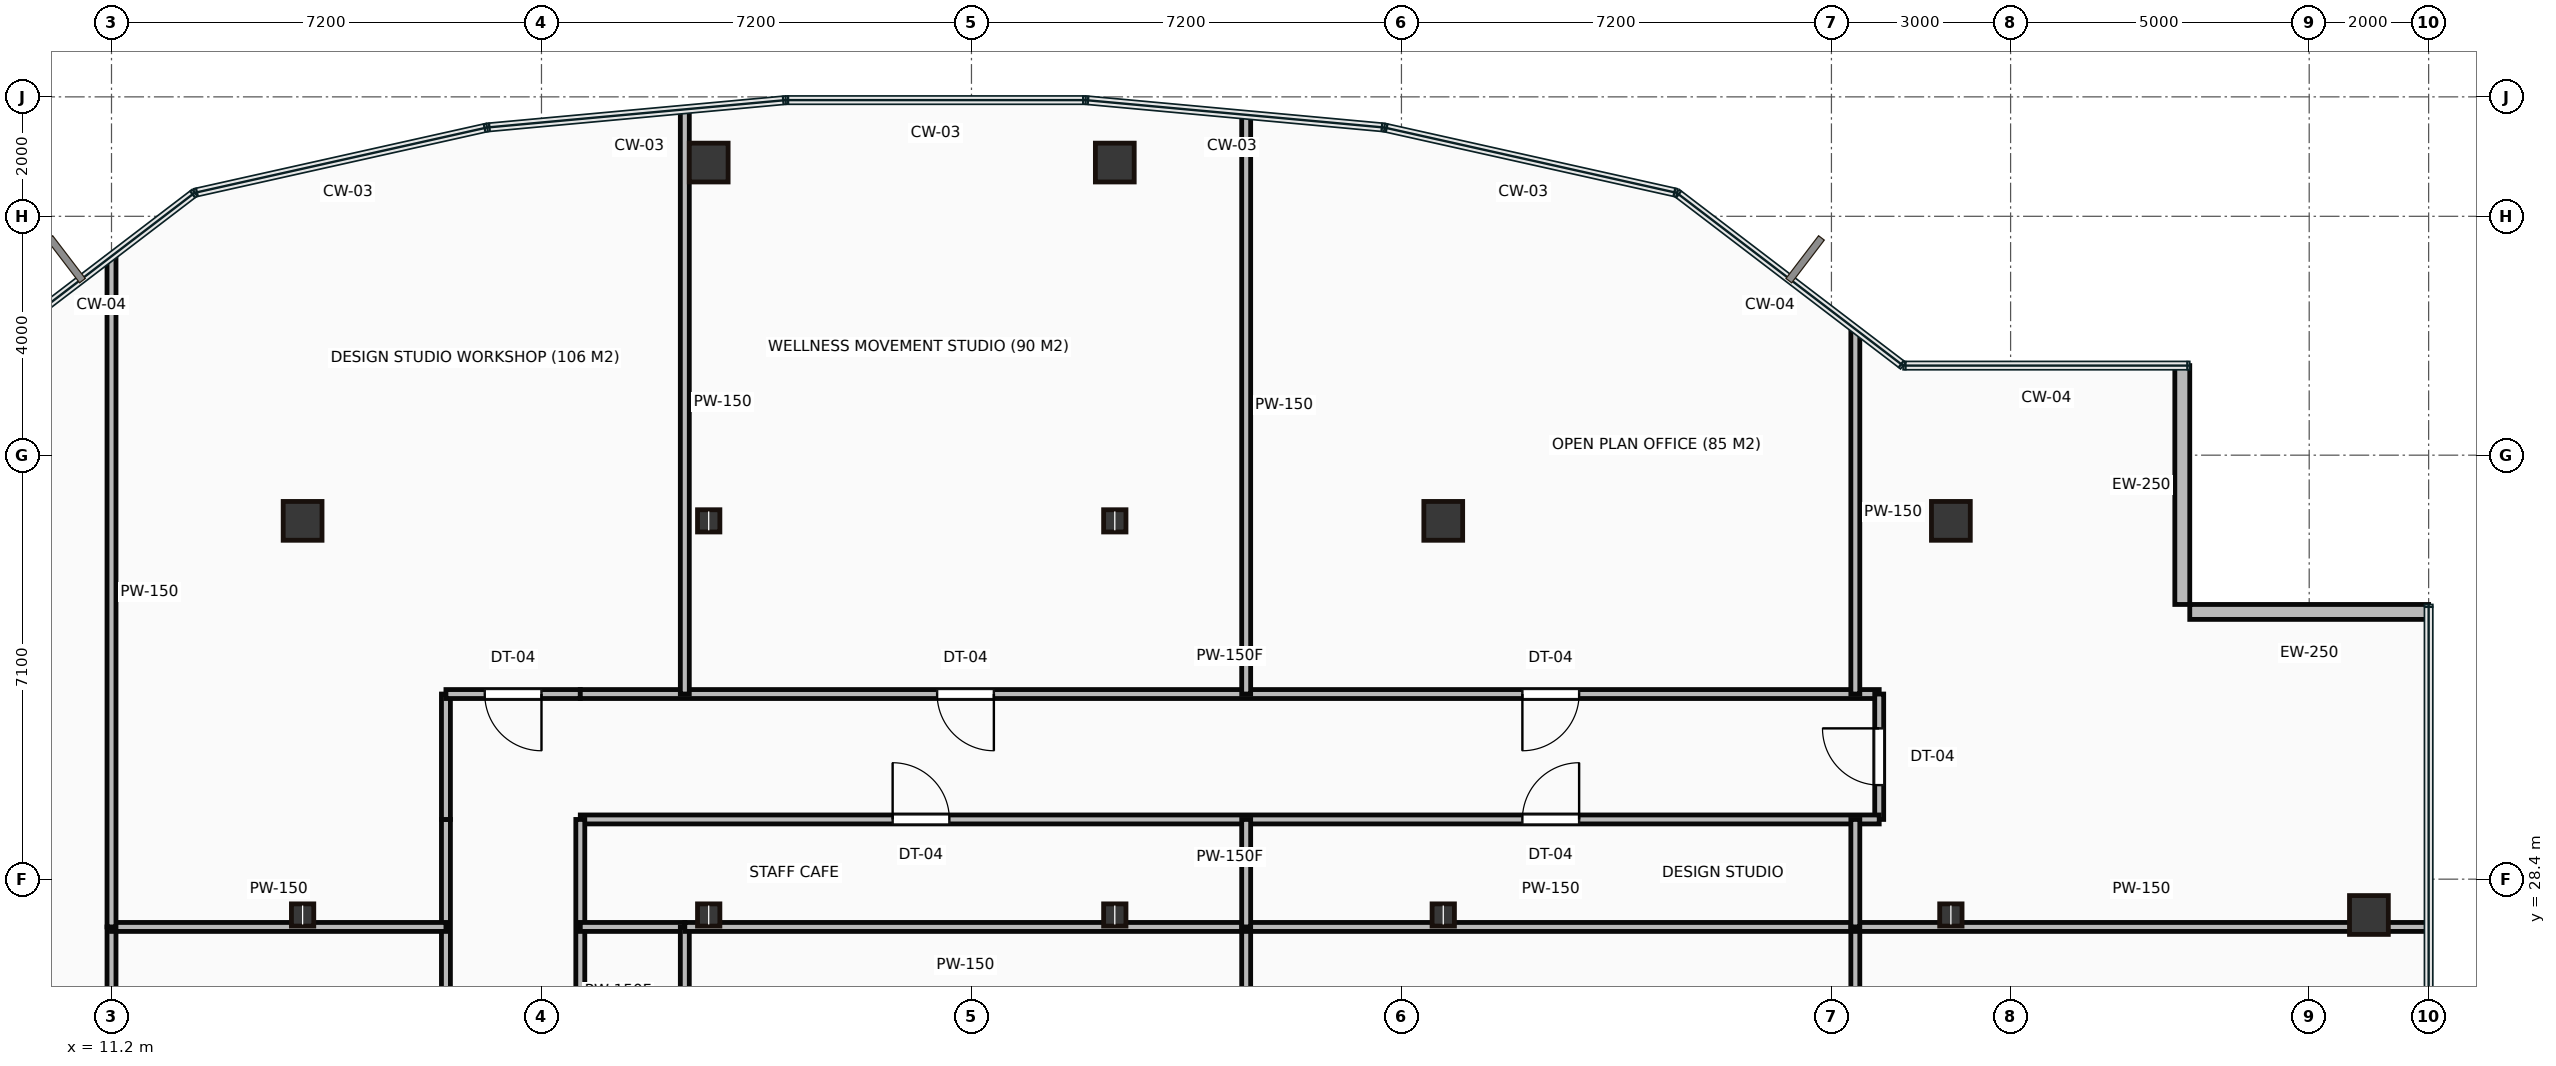
"""IFC4 building model, lengths in metres.
Left out: names, types, materials, properties, quantities, classifications, styles, units other than length and angle.
Written with IfcOpenShell. Run it as: python <this file> out.ifc"""

import sys

from ifc_helpers import new_model, si_unit, direction, frame, frame_2d, origin, origin_2d, place, context, subcontext, project, spatial, rectangle, hollow_rectangle, i_section, extrude, source, transform, mapped, element, fill, save


model = new_model("IFC4")
c1 = context("Model", 3, precision=1e-05, world=origin(), true_north=direction((0.0, 1.0)))
c2 = subcontext(c1, "Body", "Model", "MODEL_VIEW")
j1 = project(units=[si_unit("LENGTHUNIT", "METRE"), si_unit("PLANEANGLEUNIT", "RADIAN")], contexts=[c1])
p1 = place(None, origin())
s1 = spatial("IfcSite", under=j1, at=p1, CompositionType="ELEMENT")
p2 = place(p1, origin())
s2 = spatial("IfcBuilding", under=s1, at=p2, CompositionType="ELEMENT")
p3 = place(p2, frame((0.0, 0.0, 158.85)))
s3 = spatial("IfcBuildingStorey", under=s2, at=p3, CompositionType="ELEMENT", Elevation=158.85)
m1 = source(origin(), c2, "Body", "SweptSolid", [
    extrude(i_section(OverallWidth=0.374, OverallDepth=0.372, WebThickness=0.016, FlangeThickness=0.026, at=origin_2d()), origin(), (0.0, 0.0, 1.0), 3.65),
])
p4 = place(p3, frame((14.4, 27.8, 0.0), z_axis=(0.0, 0.0, 1.0), x_axis=(1.0, 0.0, 0.0)))
e1 = element("IfcColumn", 1, at=p4, inside=s3, PredefinedType="COLUMN", context=c2, shape_type="MappedRepresentation", body=[
    mapped(m1, transform((0.0, 0.0, 0.0))),
])
m2 = source(origin(), c2, "Body", "SweptSolid", [
    extrude(hollow_rectangle(XDim=0.65, YDim=0.65, WallThickness=0.032, at=origin_2d()), origin(), (0.0, 0.0, 1.0), 3.65),
])
p5 = place(p3, frame((14.4, 34.4, 0.0), z_axis=(0.0, 0.0, 1.0), x_axis=(1.0, 0.0, 0.0)))
e2 = element("IfcColumn", 2, at=p5, inside=s3, PredefinedType="COLUMN", context=c2, shape_type="MappedRepresentation", body=[
    mapped(m2, transform((0.0, 0.0, 0.0))),
])
for number, where, z_axis, x_axis in (
    (3, (21.2, 27.8, 0.0), (0.0, 0.0, 1.0), (1.0, 0.0, 0.0)),
    (4, (21.2, 34.4, 0.0), (0.0, 0.0, 1.0), (1.0, 0.0, 0.0)),
):
    element("IfcColumn", number, at=place(p3, frame(where, z_axis=z_axis, x_axis=x_axis)), inside=s3, PredefinedType="COLUMN", context=c2, shape_type="MappedRepresentation", body=[
        mapped(m1, transform((0.0, 0.0, 0.0))),
    ])
p6 = place(p3, frame((21.2, 40.4, 0.0), z_axis=(0.0, 0.0, 1.0), x_axis=(1.0, 0.0, 0.0)))
e5 = element("IfcColumn", 5, at=p6, inside=s3, PredefinedType="COLUMN", context=c2, shape_type="MappedRepresentation", body=[
    mapped(m2, transform((0.0, 0.0, 0.0))),
])
for number, where, z_axis, x_axis in (
    (6, (28.0, 27.8, 0.0), (0.0, 0.0, 1.0), (1.0, 0.0, 0.0)),
    (7, (28.0, 34.4, 0.0), (0.0, 0.0, 1.0), (1.0, 0.0, 0.0)),
):
    element("IfcColumn", number, at=place(p3, frame(where, z_axis=z_axis, x_axis=x_axis)), inside=s3, PredefinedType="COLUMN", context=c2, shape_type="MappedRepresentation", body=[
        mapped(m1, transform((0.0, 0.0, 0.0))),
    ])
p7 = place(p3, frame((28.0, 40.4, 0.0), z_axis=(0.0, 0.0, 1.0), x_axis=(1.0, 0.0, 0.0)))
e8 = element("IfcColumn", 8, at=p7, inside=s3, PredefinedType="COLUMN", context=c2, shape_type="MappedRepresentation", body=[
    mapped(m2, transform((0.0, 0.0, 0.0))),
])
p8 = place(p3, frame((33.5, 27.8, 0.0), z_axis=(0.0, 0.0, 1.0), x_axis=(1.0, 0.0, 0.0)))
e9 = element("IfcColumn", 9, at=p8, inside=s3, PredefinedType="COLUMN", context=c2, shape_type="MappedRepresentation", body=[
    mapped(m1, transform((0.0, 0.0, 0.0))),
])
p9 = place(p3, frame((33.5, 34.4, 0.0), z_axis=(0.0, 0.0, 1.0), x_axis=(1.0, 0.0, 0.0)))
e10 = element("IfcColumn", 10, at=p9, inside=s3, PredefinedType="COLUMN", context=c2, shape_type="MappedRepresentation", body=[
    mapped(m2, transform((0.0, 0.0, 0.0))),
])
p10 = place(p3, frame((42.0, 27.8, 0.0), z_axis=(0.0, 0.0, 1.0), x_axis=(1.0, 0.0, 0.0)))
e11 = element("IfcColumn", 11, at=p10, inside=s3, PredefinedType="COLUMN", context=c2, shape_type="MappedRepresentation", body=[
    mapped(m1, transform((0.0, 0.0, 0.0))),
])
for number, where, z_axis, x_axis in (
    (12, (42.0, 34.4, 0.0), (0.0, 0.0, 1.0), (1.0, 0.0, 0.0)),
    (13, (49.0, 27.8, 0.0), (0.0, 0.0, 1.0), (1.0, 0.0, 0.0)),
):
    element("IfcColumn", number, at=place(p3, frame(where, z_axis=z_axis, x_axis=x_axis)), inside=s3, PredefinedType="COLUMN", context=c2, shape_type="MappedRepresentation", body=[
        mapped(m2, transform((0.0, 0.0, 0.0))),
    ])
m3 = source(origin(), c2, "Body", "SweptSolid", [
    extrude(rectangle(XDim=4.0, YDim=0.25, at=frame_2d((2.0, 0.0))), origin(), (0.0, 0.0, 1.0), 3.4),
])
for number, where, z_axis, x_axis in (
    (14, (50.0, 32.875, 0.0), (0.0, 0.0, 1.0), (-1.0, 0.0, 0.0)),
    (15, (45.875, 33.0, 0.0), (0.0, 0.0, 1.0), (0.0, 1.0, 0.0)),
):
    element("IfcWall", number, at=place(p3, frame(where, z_axis=z_axis, x_axis=x_axis)), inside=s3, PredefinedType="STANDARD", context=c2, shape_type="MappedRepresentation", body=[
        mapped(m3, transform((0.0, 0.0, 0.0))),
    ])
m4 = source(origin(), c2, "Body", "SweptSolid", [
    extrude(rectangle(XDim=13.1, YDim=0.15, at=frame_2d((6.55, 0.0))), origin(), (0.0, 0.0, 1.0), 3.4),
])
p11 = place(p3, frame((16.8, 16.3, 0.0), z_axis=(0.0, 0.0, 1.0), x_axis=(0.0, 1.0, 0.0)))
e16 = element("IfcWall", 16, at=p11, inside=s3, PredefinedType="PARTITIONING", context=c2, shape_type="MappedRepresentation", body=[
    mapped(m4, transform((0.0, 0.0, 0.0))),
])
p12 = place(p11, frame((5.305, 0.0, 0.0)))
e17 = element("IfcOpeningElement", 17, at=p12, cuts=e16, PredefinedType="OPENING", context=c2, shape_type="SweptSolid", body=[
    extrude(rectangle(XDim=0.95, YDim=2.15, at=frame_2d((0.475, 1.075))), frame((0.0, 0.085, 0.0), z_axis=(0.0, -1.0, 0.0), x_axis=(1.0, 0.0, 0.0)), (0.0, 0.0, 1.0), 0.17),
])
m5 = source(origin(), c2, "Body", "SweptSolid", [
    extrude(rectangle(XDim=2.1, YDim=0.15, at=frame_2d((1.05, 0.0))), origin(), (0.0, 0.0, 1.0), 3.4),
])
p13 = place(p3, frame((16.8, 29.4, 0.0), z_axis=(0.0, 0.0, 1.0), x_axis=(0.0, 1.0, 0.0)))
e18 = element("IfcWall", 18, at=p13, inside=s3, PredefinedType="PARTITIONING", context=c2, shape_type="MappedRepresentation", body=[
    mapped(m5, transform((0.0, 0.0, 0.0))),
])
m6 = source(origin(), c2, "Body", "SweptSolid", [
    extrude(rectangle(XDim=2.25, YDim=0.15, at=frame_2d((1.125, 0.0))), origin(), (0.0, 0.0, 1.0), 3.4),
])
p14 = place(p3, frame((16.8, 31.5, 0.0), z_axis=(0.0, 0.0, 1.0), x_axis=(1.0, 0.0, 0.0)))
e19 = element("IfcWall", 19, at=p14, inside=s3, PredefinedType="PARTITIONING", context=c2, shape_type="MappedRepresentation", body=[
    mapped(m6, transform((0.0, 0.0, 0.0))),
])
p15 = place(p14, frame((0.65, 0.0, 0.0)))
e20 = element("IfcOpeningElement", 20, at=p15, cuts=e19, PredefinedType="OPENING", context=c2, shape_type="SweptSolid", body=[
    extrude(rectangle(XDim=0.95, YDim=2.15, at=frame_2d((0.475, 1.075))), frame((0.0, 0.085, 0.0), z_axis=(0.0, -1.0, 0.0), x_axis=(1.0, 0.0, 0.0)), (0.0, 0.0, 1.0), 0.17),
])
m7 = source(origin(), c2, "Body", "SweptSolid", [
    extrude(rectangle(XDim=21.75, YDim=0.15, at=frame_2d((10.875, 0.0))), origin(), (0.0, 0.0, 1.0), 3.4),
])
p16 = place(p3, frame((19.05, 31.5, 0.0), z_axis=(0.0, 0.0, 1.0), x_axis=(1.0, 0.0, 0.0)))
e21 = element("IfcWall", 21, at=p16, inside=s3, PredefinedType="PARTITIONING", context=c2, shape_type="MappedRepresentation", body=[
    mapped(m7, transform((0.0, 0.0, 0.0))),
])
p17 = place(p16, frame((5.975, 0.0, 0.0)))
e22 = element("IfcOpeningElement", 22, at=p17, cuts=e21, PredefinedType="OPENING", context=c2, shape_type="SweptSolid", body=[
    extrude(rectangle(XDim=0.95, YDim=2.15, at=frame_2d((0.475, 1.075))), frame((0.0, 0.085, 0.0), z_axis=(0.0, -1.0, 0.0), x_axis=(1.0, 0.0, 0.0)), (0.0, 0.0, 1.0), 0.17),
])
p18 = place(p16, frame((15.775, 0.0, 0.0)))
e23 = element("IfcOpeningElement", 23, at=p18, cuts=e21, PredefinedType="OPENING", context=c2, shape_type="SweptSolid", body=[
    extrude(rectangle(XDim=0.95, YDim=2.15, at=frame_2d((0.475, 1.075))), frame((0.0, 0.085, 0.0), z_axis=(0.0, -1.0, 0.0), x_axis=(1.0, 0.0, 0.0)), (0.0, 0.0, 1.0), 0.17),
])
p19 = place(p3, frame((40.8, 31.5, 0.0), z_axis=(0.0, 0.0, 1.0), x_axis=(0.0, -1.0, 0.0)))
e24 = element("IfcWall", 24, at=p19, inside=s3, PredefinedType="PARTITIONING", context=c2, shape_type="MappedRepresentation", body=[
    mapped(m5, transform((0.0, 0.0, 0.0))),
])
p20 = place(p19, frame((0.575, 0.0, 0.0)))
e25 = element("IfcOpeningElement", 25, at=p20, cuts=e24, PredefinedType="OPENING", context=c2, shape_type="SweptSolid", body=[
    extrude(rectangle(XDim=0.95, YDim=2.15, at=frame_2d((0.475, 1.075))), frame((0.0, 0.085, 0.0), z_axis=(0.0, -1.0, 0.0), x_axis=(1.0, 0.0, 0.0)), (0.0, 0.0, 1.0), 0.17),
])
p21 = place(p3, frame((40.8, 29.4, 0.0), z_axis=(0.0, 0.0, 1.0), x_axis=(-1.0, 0.0, 0.0)))
e26 = element("IfcWall", 26, at=p21, inside=s3, PredefinedType="PARTITIONING", context=c2, shape_type="MappedRepresentation", body=[
    mapped(m7, transform((0.0, 0.0, 0.0))),
])
p22 = place(p21, frame((15.57, 0.0, 0.0)))
e27 = element("IfcOpeningElement", 27, at=p22, cuts=e26, PredefinedType="OPENING", context=c2, shape_type="SweptSolid", body=[
    extrude(rectangle(XDim=0.95, YDim=2.15, at=frame_2d((0.475, 1.075))), frame((0.0, 0.085, 0.0), z_axis=(0.0, -1.0, 0.0), x_axis=(1.0, 0.0, 0.0)), (0.0, 0.0, 1.0), 0.17),
])
p23 = place(p21, frame((5.025, 0.0, 0.0)))
e28 = element("IfcOpeningElement", 28, at=p23, cuts=e26, PredefinedType="OPENING", context=c2, shape_type="SweptSolid", body=[
    extrude(rectangle(XDim=0.95, YDim=2.15, at=frame_2d((0.475, 1.075))), frame((0.0, 0.085, 0.0), z_axis=(0.0, -1.0, 0.0), x_axis=(1.0, 0.0, 0.0)), (0.0, 0.0, 1.0), 0.17),
])
p24 = place(p3, frame((19.05, 29.4, 0.0), z_axis=(0.0, 0.0, 1.0), x_axis=(0.0, -1.0, 0.0)))
e29 = element("IfcWall", 29, at=p24, inside=s3, PredefinedType="PARTITIONING", context=c2, shape_type="MappedRepresentation", body=[
    mapped(m4, transform((0.0, 0.0, 0.0))),
])
p25 = place(p24, frame((6.845, 0.0, 0.0)))
e30 = element("IfcOpeningElement", 30, at=p25, cuts=e29, PredefinedType="OPENING", context=c2, shape_type="SweptSolid", body=[
    extrude(rectangle(XDim=0.95, YDim=2.15, at=frame_2d((0.475, 1.075))), frame((0.0, 0.085, 0.0), z_axis=(0.0, -1.0, 0.0), x_axis=(1.0, 0.0, 0.0)), (0.0, 0.0, 1.0), 0.17),
])
m8 = source(origin(), c2, "Body", "SweptSolid", [
    extrude(rectangle(XDim=11.3, YDim=0.15, at=frame_2d((5.65, 0.0))), origin(), (0.0, 0.0, 1.0), 3.4),
])
p26 = place(p3, frame((11.2, 27.6, 0.0), z_axis=(0.0, 0.0, 1.0), x_axis=(0.0, -1.0, 0.0)))
e31 = element("IfcWall", 31, at=p26, inside=s3, PredefinedType="PARTITIONING", context=c2, shape_type="MappedRepresentation", body=[
    mapped(m8, transform((0.0, 0.0, 0.0))),
])
m9 = source(origin(), c2, "Body", "SweptSolid", [
    extrude(rectangle(XDim=5.6, YDim=0.15, at=frame_2d((2.8, 0.0))), origin(), (0.0, 0.0, 1.0), 3.4),
])
p27 = place(p3, frame((11.2, 27.6, 0.0), z_axis=(0.0, 0.0, 1.0), x_axis=(1.0, 0.0, 0.0)))
e32 = element("IfcWall", 32, at=p27, inside=s3, PredefinedType="PARTITIONING", context=c2, shape_type="MappedRepresentation", body=[
    mapped(m9, transform((0.0, 0.0, 0.0))),
])
m10 = source(origin(), c2, "Body", "SweptSolid", [
    extrude(rectangle(XDim=11.206, YDim=0.15, at=frame_2d((5.603, 0.0))), origin(), (0.0, 0.0, 1.0), 3.4),
])
p28 = place(p3, frame((11.2, 38.806, 0.0), z_axis=(0.0, 0.0, 1.0), x_axis=(0.0, -1.0, 0.0)))
e33 = element("IfcWall", 33, at=p28, inside=s3, PredefinedType="PARTITIONING", context=c2, shape_type="MappedRepresentation", body=[
    mapped(m10, transform((0.0, 0.0, 0.0))),
])
m11 = source(origin(), c2, "Body", "SweptSolid", [
    extrude(rectangle(XDim=1.75, YDim=0.15, at=frame_2d((0.875, 0.0))), origin(), (0.0, 0.0, 1.0), 3.4),
])
p29 = place(p3, frame((19.05, 27.6, 0.0), z_axis=(0.0, 0.0, 1.0), x_axis=(1.0, 0.0, 0.0)))
e34 = element("IfcWall", 34, at=p29, inside=s3, PredefinedType="PARTITIONING", context=c2, shape_type="MappedRepresentation", body=[
    mapped(m11, transform((0.0, 0.0, 0.0))),
])
p30 = place(p3, frame((20.8, 27.6, 0.0), z_axis=(0.0, 0.0, 1.0), x_axis=(0.0, -1.0, 0.0)))
e35 = element("IfcWall", 35, at=p30, inside=s3, PredefinedType="PARTITIONING", context=c2, shape_type="MappedRepresentation", body=[
    mapped(m8, transform((0.0, 0.0, 0.0))),
])
m12 = source(origin(), c2, "Body", "SweptSolid", [
    extrude(rectangle(XDim=9.4, YDim=0.15, at=frame_2d((4.7, 0.0))), origin(), (0.0, 0.0, 1.0), 3.4),
])
p31 = place(p3, frame((30.2, 27.6, 0.0), z_axis=(0.0, 0.0, 1.0), x_axis=(-1.0, 0.0, 0.0)))
e36 = element("IfcWall", 36, at=p31, inside=s3, PredefinedType="PARTITIONING", context=c2, shape_type="MappedRepresentation", body=[
    mapped(m12, transform((0.0, 0.0, 0.0))),
])
m13 = source(origin(), c2, "Body", "SweptSolid", [
    extrude(rectangle(XDim=9.771, YDim=0.15, at=frame_2d((4.885, 0.0))), origin(), (0.0, 0.0, 1.0), 3.4),
])
p32 = place(p3, frame((20.8, 41.271, 0.0), z_axis=(0.0, 0.0, 1.0), x_axis=(0.0, -1.0, 0.0)))
e37 = element("IfcWall", 37, at=p32, inside=s3, PredefinedType="PARTITIONING", context=c2, shape_type="MappedRepresentation", body=[
    mapped(m13, transform((0.0, 0.0, 0.0))),
])
p33 = place(p3, frame((30.2, 27.6, 0.0), z_axis=(0.0, 0.0, 1.0), x_axis=(0.0, -1.0, 0.0)))
e38 = element("IfcWall", 38, at=p33, inside=s3, PredefinedType="PARTITIONING", context=c2, shape_type="MappedRepresentation", body=[
    mapped(m8, transform((0.0, 0.0, 0.0))),
])
m14 = source(origin(), c2, "Body", "SweptSolid", [
    extrude(rectangle(XDim=10.2, YDim=0.15, at=frame_2d((5.1, 0.0))), origin(), (0.0, 0.0, 1.0), 3.4),
])
p34 = place(p3, frame((30.2, 27.6, 0.0), z_axis=(0.0, 0.0, 1.0), x_axis=(1.0, 0.0, 0.0)))
e39 = element("IfcWall", 39, at=p34, inside=s3, PredefinedType="PARTITIONING", context=c2, shape_type="MappedRepresentation", body=[
    mapped(m14, transform((0.0, 0.0, 0.0))),
])
m15 = source(origin(), c2, "Body", "SweptSolid", [
    extrude(rectangle(XDim=1.8, YDim=0.15, at=frame_2d((0.9, 0.0))), origin(), (0.0, 0.0, 1.0), 3.4),
])
p35 = place(p3, frame((30.2, 29.4, 0.0), z_axis=(0.0, 0.0, 1.0), x_axis=(0.0, -1.0, 0.0)))
e40 = element("IfcWall", 40, at=p35, inside=s3, PredefinedType="PARTITIONING", context=c2, shape_type="MappedRepresentation", body=[
    mapped(m15, transform((0.0, 0.0, 0.0))),
])
m16 = source(origin(), c2, "Body", "SweptSolid", [
    extrude(rectangle(XDim=9.679, YDim=0.15, at=frame_2d((4.839, 0.0))), origin(), (0.0, 0.0, 1.0), 3.4),
])
p36 = place(p3, frame((30.2, 41.179, 0.0), z_axis=(0.0, 0.0, 1.0), x_axis=(0.0, -1.0, 0.0)))
e41 = element("IfcWall", 41, at=p36, inside=s3, PredefinedType="PARTITIONING", context=c2, shape_type="MappedRepresentation", body=[
    mapped(m16, transform((0.0, 0.0, 0.0))),
])
p37 = place(p3, frame((40.4, 27.6, 0.0), z_axis=(0.0, 0.0, 1.0), x_axis=(0.0, -1.0, 0.0)))
e42 = element("IfcWall", 42, at=p37, inside=s3, PredefinedType="PARTITIONING", context=c2, shape_type="MappedRepresentation", body=[
    mapped(m8, transform((0.0, 0.0, 0.0))),
])
m17 = source(origin(), c2, "Body", "SweptSolid", [
    extrude(rectangle(XDim=9.58, YDim=0.15, at=frame_2d((4.79, 0.0))), origin(), (0.0, 0.0, 1.0), 3.4),
])
p38 = place(p3, frame((40.4, 27.6, 0.0), z_axis=(0.0, 0.0, 1.0), x_axis=(1.0, 0.0, 0.0)))
e43 = element("IfcWall", 43, at=p38, inside=s3, PredefinedType="PARTITIONING", context=c2, shape_type="MappedRepresentation", body=[
    mapped(m17, transform((0.0, 0.0, 0.0))),
])
p39 = place(p3, frame((40.4, 29.4, 0.0), z_axis=(0.0, 0.0, 1.0), x_axis=(0.0, -1.0, 0.0)))
e44 = element("IfcWall", 44, at=p39, inside=s3, PredefinedType="PARTITIONING", context=c2, shape_type="MappedRepresentation", body=[
    mapped(m15, transform((0.0, 0.0, 0.0))),
])
m18 = source(origin(), c2, "Body", "SweptSolid", [
    extrude(rectangle(XDim=6.085, YDim=0.15, at=frame_2d((3.043, 0.0))), origin(), (0.0, 0.0, 1.0), 3.4),
])
p40 = place(p3, frame((40.4, 37.585, 0.0), z_axis=(0.0, 0.0, 1.0), x_axis=(0.0, -1.0, 0.0)))
e45 = element("IfcWall", 45, at=p40, inside=s3, PredefinedType="PARTITIONING", context=c2, shape_type="MappedRepresentation", body=[
    mapped(m18, transform((0.0, 0.0, 0.0))),
])
m19 = source(origin(), c2, "Body", "SweptSolid", [
    extrude(rectangle(XDim=0.95, YDim=2.15, at=frame_2d((0.475, 1.075))), frame((0.0, 0.025, 0.0), z_axis=(0.0, -1.0, 0.0), x_axis=(1.0, 0.0, 0.0)), (0.0, 0.0, 1.0), 0.05),
])
p41 = place(p15, origin())
e46 = element("IfcDoor", 46, at=p41, inside=s3, OperationType="SINGLE_SWING_RIGHT", PredefinedType="DOOR", context=c2, shape_type="MappedRepresentation", body=[
    mapped(m19, transform((0.0, 0.0, 0.0))),
])
fill(e20, e46)
p42 = place(p22, origin())
e47 = element("IfcDoor", 47, at=p42, inside=s3, OperationType="SINGLE_SWING_RIGHT", PredefinedType="DOOR", context=c2, shape_type="MappedRepresentation", body=[
    mapped(m19, transform((0.0, 0.0, 0.0))),
])
fill(e27, e47)
p43 = place(p17, origin())
e48 = element("IfcDoor", 48, at=p43, inside=s3, OperationType="SINGLE_SWING_RIGHT", PredefinedType="DOOR", context=c2, shape_type="MappedRepresentation", body=[
    mapped(m19, transform((0.0, 0.0, 0.0))),
])
fill(e22, e48)
p44 = place(p18, origin())
e49 = element("IfcDoor", 49, at=p44, inside=s3, OperationType="SINGLE_SWING_LEFT", PredefinedType="DOOR", context=c2, shape_type="MappedRepresentation", body=[
    mapped(m19, transform((0.0, 0.0, 0.0))),
])
fill(e23, e49)
p45 = place(p23, origin())
e50 = element("IfcDoor", 50, at=p45, inside=s3, OperationType="SINGLE_SWING_LEFT", PredefinedType="DOOR", context=c2, shape_type="MappedRepresentation", body=[
    mapped(m19, transform((0.0, 0.0, 0.0))),
])
fill(e28, e50)
p46 = place(p20, origin())
e51 = element("IfcDoor", 51, at=p46, inside=s3, OperationType="SINGLE_SWING_LEFT", PredefinedType="DOOR", context=c2, shape_type="MappedRepresentation", body=[
    mapped(m19, transform((0.0, 0.0, 0.0))),
])
fill(e25, e51)
save(model, sys.argv[1])
